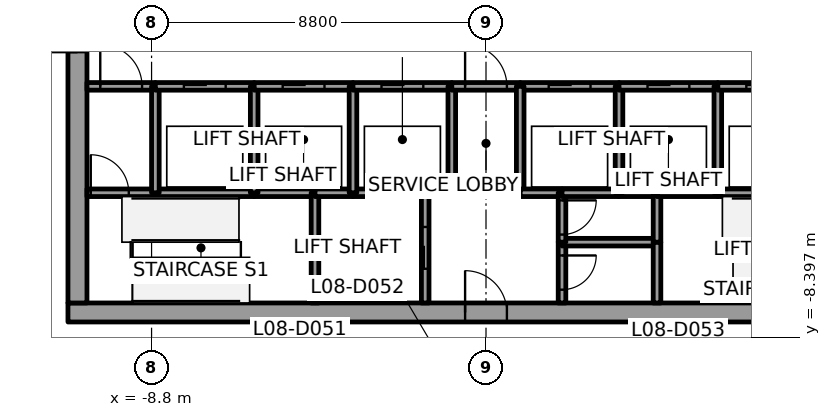
"""IFC4 building model, lengths in metres.
Left out: names, types, materials, properties, quantities, classifications, styles, units other than length and angle.
Written with IfcOpenShell. Run it as: python <this file> out.ifc"""

import sys

from ifc_helpers import new_model, si_unit, direction, frame, frame_2d, origin, place, context, subcontext, project, spatial, rectangle, extrude, element, fill, save


model = new_model("IFC4")
c1 = context("Model", 3, precision=1e-05, world=origin(), true_north=direction((0.0, 1.0)))
c2 = subcontext(c1, "Body", "Model", "MODEL_VIEW")
j1 = project(units=[si_unit("LENGTHUNIT", "METRE"), si_unit("PLANEANGLEUNIT", "RADIAN")], contexts=[c1])
p1 = place(None, origin())
s1 = spatial("IfcSite", under=j1, at=p1, CompositionType="ELEMENT")
p2 = place(p1, origin())
s2 = spatial("IfcBuilding", under=s1, at=p2, CompositionType="ELEMENT")
p3 = place(p2, frame((0.0, 0.0, 51.7)))
s3 = spatial("IfcBuildingStorey", under=s2, at=p3, CompositionType="ELEMENT", Elevation=51.7)
p4 = place(p3, frame((-11.0, -7.75, 0.0), z_axis=(0.0, 0.0, 1.0), x_axis=(1.0, 0.0, 0.0)))
e1 = element("IfcWall", 1, at=p4, inside=s3, PredefinedType="SHEAR", context=c2, shape_type="SweptSolid", body=[
    extrude(rectangle(XDim=22.0, YDim=0.5, at=frame_2d((11.0, 0.0))), origin(), (0.0, 0.0, 1.0), 3.7),
])
p5 = place(p4, frame((10.45, 0.0, 0.0)))
e2 = element("IfcOpeningElement", 2, at=p5, cuts=e1, PredefinedType="OPENING", context=c2, shape_type="SweptSolid", body=[
    extrude(rectangle(XDim=1.1, YDim=2.1, at=frame_2d((0.55, 1.05))), frame((0.0, 0.25, 0.0), z_axis=(0.0, -1.0, 0.0), x_axis=(1.0, 0.0, 0.0)), (0.0, 0.0, 1.0), 0.5),
])
p6 = place(p3, frame((-10.75, -7.5, 0.0), z_axis=(0.0, 0.0, 1.0), x_axis=(0.0, 1.0, 0.0)))
e3 = element("IfcWall", 3, at=p6, inside=s3, PredefinedType="SHEAR", context=c2, shape_type="SweptSolid", body=[
    extrude(rectangle(XDim=15.0, YDim=0.5, at=frame_2d((7.5, 0.0))), origin(), (0.0, 0.0, 1.0), 3.7),
])
p7 = place(p6, frame((6.6, 0.0, 0.0)))
e4 = element("IfcOpeningElement", 4, at=p7, cuts=e3, PredefinedType="OPENING", context=c2, shape_type="SweptSolid", body=[
    extrude(rectangle(XDim=1.8, YDim=2.1, at=frame_2d((0.9, 1.05))), frame((0.0, 0.25, 0.0), z_axis=(0.0, -1.0, 0.0), x_axis=(1.0, 0.0, 0.0)), (0.0, 0.0, 1.0), 0.5),
])
p8 = place(p3, frame((-10.5, -4.6, 0.0), z_axis=(0.0, 0.0, 1.0), x_axis=(1.0, 0.0, 0.0)))
e5 = element("IfcWall", 5, at=p8, inside=s3, PredefinedType="SOLIDWALL", context=c2, shape_type="SweptSolid", body=[
    extrude(rectangle(XDim=1.8, YDim=0.2, at=frame_2d((0.9, 0.0))), origin(), (0.0, 0.0, 1.0), 3.55),
])
p9 = place(p8, frame((0.1, 0.0, 0.0)))
e6 = element("IfcOpeningElement", 6, at=p9, cuts=e5, PredefinedType="OPENING", context=c2, shape_type="SweptSolid", body=[
    extrude(rectangle(XDim=1.0, YDim=2.1, at=frame_2d((0.5, 1.05))), frame((0.0, 0.1, 0.0), z_axis=(0.0, -1.0, 0.0), x_axis=(1.0, 0.0, 0.0)), (0.0, 0.0, 1.0), 0.2),
])
p10 = place(p3, frame((-10.5, -1.8, 0.0), z_axis=(0.0, 0.0, 1.0), x_axis=(1.0, 0.0, 0.0)))
e7 = element("IfcWall", 7, at=p10, inside=s3, PredefinedType="SOLIDWALL", context=c2, shape_type="SweptSolid", body=[
    extrude(rectangle(XDim=1.8, YDim=0.2, at=frame_2d((0.9, 0.0))), origin(), (0.0, 0.0, 1.0), 3.55),
])
p11 = place(p10, frame((0.35, 0.0, 0.0)))
e8 = element("IfcOpeningElement", 8, at=p11, cuts=e7, PredefinedType="OPENING", context=c2, shape_type="SweptSolid", body=[
    extrude(rectangle(XDim=1.1, YDim=2.1, at=frame_2d((0.55, 1.05))), frame((0.0, 0.1, 0.0), z_axis=(0.0, -1.0, 0.0), x_axis=(1.0, 0.0, 0.0)), (0.0, 0.0, 1.0), 0.2),
])
p12 = place(p3, frame((-8.7, -4.6, 0.0), z_axis=(0.0, 0.0, 1.0), x_axis=(1.0, 0.0, 0.0)))
e9 = element("IfcWall", 9, at=p12, inside=s3, PredefinedType="SOLIDWALL", context=c2, shape_type="SweptSolid", body=[
    extrude(rectangle(XDim=2.6, YDim=0.2, at=frame_2d((1.3, 0.0))), origin(), (0.0, 0.0, 1.0), 3.55),
])
p13 = place(p3, frame((-8.7, -4.6, 0.0), z_axis=(0.0, 0.0, 1.0), x_axis=(0.0, 1.0, 0.0)))
e10 = element("IfcWall", 10, at=p13, inside=s3, PredefinedType="SOLIDWALL", context=c2, shape_type="SweptSolid", body=[
    extrude(rectangle(XDim=2.8, YDim=0.2, at=frame_2d((1.4, 0.0))), origin(), (0.0, 0.0, 1.0), 3.55),
])
p14 = place(p3, frame((-8.7, -1.8, 0.0), z_axis=(0.0, 0.0, 1.0), x_axis=(1.0, 0.0, 0.0)))
e11 = element("IfcWall", 11, at=p14, inside=s3, PredefinedType="SOLIDWALL", context=c2, shape_type="SweptSolid", body=[
    extrude(rectangle(XDim=2.6, YDim=0.2, at=frame_2d((1.3, 0.0))), origin(), (0.0, 0.0, 1.0), 3.55),
])
p15 = place(p14, frame((0.75, 0.0, 0.0)))
e12 = element("IfcOpeningElement", 12, at=p15, cuts=e11, PredefinedType="OPENING", context=c2, shape_type="SweptSolid", body=[
    extrude(rectangle(XDim=1.1, YDim=2.1, at=frame_2d((0.55, 1.05))), frame((0.0, 0.1, 0.0), z_axis=(0.0, -1.0, 0.0), x_axis=(1.0, 0.0, 0.0)), (0.0, 0.0, 1.0), 0.2),
])
p16 = place(p3, frame((-6.1, -4.6, 0.0), z_axis=(0.0, 0.0, 1.0), x_axis=(1.0, 0.0, 0.0)))
e13 = element("IfcWall", 13, at=p16, inside=s3, PredefinedType="SOLIDWALL", context=c2, shape_type="SweptSolid", body=[
    extrude(rectangle(XDim=1.6, YDim=0.2, at=frame_2d((0.8, 0.0))), origin(), (0.0, 0.0, 1.0), 3.55),
])
p17 = place(p3, frame((-6.1, -4.6, 0.0), z_axis=(0.0, 0.0, 1.0), x_axis=(0.0, 1.0, 0.0)))
e14 = element("IfcWall", 14, at=p17, inside=s3, PredefinedType="SOLIDWALL", context=c2, shape_type="SweptSolid", body=[
    extrude(rectangle(XDim=2.8, YDim=0.2, at=frame_2d((1.4, 0.0))), origin(), (0.0, 0.0, 1.0), 3.55),
])
p18 = place(p3, frame((-6.1, -1.8, 0.0), z_axis=(0.0, 0.0, 1.0), x_axis=(1.0, 0.0, 0.0)))
e15 = element("IfcWall", 15, at=p18, inside=s3, PredefinedType="SOLIDWALL", context=c2, shape_type="SweptSolid", body=[
    extrude(rectangle(XDim=2.6, YDim=0.2, at=frame_2d((1.3, 0.0))), origin(), (0.0, 0.0, 1.0), 3.55),
])
p19 = place(p18, frame((0.75, 0.0, 0.0)))
e16 = element("IfcOpeningElement", 16, at=p19, cuts=e15, PredefinedType="OPENING", context=c2, shape_type="SweptSolid", body=[
    extrude(rectangle(XDim=1.1, YDim=2.1, at=frame_2d((0.55, 1.05))), frame((0.0, 0.1, 0.0), z_axis=(0.0, -1.0, 0.0), x_axis=(1.0, 0.0, 0.0)), (0.0, 0.0, 1.0), 0.2),
])
p20 = place(p3, frame((-4.5, -4.6, 0.0), z_axis=(0.0, 0.0, 1.0), x_axis=(0.0, -1.0, 0.0)))
e17 = element("IfcWall", 17, at=p20, inside=s3, PredefinedType="SOLIDWALL", context=c2, shape_type="SweptSolid", body=[
    extrude(rectangle(XDim=2.9, YDim=0.2, at=frame_2d((1.45, 0.0))), origin(), (0.0, 0.0, 1.0), 3.55),
])
p21 = place(p3, frame((-4.5, -4.6, 0.0), z_axis=(0.0, 0.0, 1.0), x_axis=(1.0, 0.0, 0.0)))
e18 = element("IfcWall", 18, at=p21, inside=s3, PredefinedType="SOLIDWALL", context=c2, shape_type="SweptSolid", body=[
    extrude(rectangle(XDim=1.0, YDim=0.2, at=frame_2d((0.5, 0.0))), origin(), (0.0, 0.0, 1.0), 3.55),
])
p22 = place(p3, frame((-3.5, -4.6, 0.0), z_axis=(0.0, 0.0, 1.0), x_axis=(1.0, 0.0, 0.0)))
e19 = element("IfcWall", 19, at=p22, inside=s3, PredefinedType="SOLIDWALL", context=c2, shape_type="SweptSolid", body=[
    extrude(rectangle(XDim=1.9, YDim=0.2, at=frame_2d((0.95, 0.0))), origin(), (0.0, 0.0, 1.0), 3.55),
])
p23 = place(p3, frame((-3.5, -4.6, 0.0), z_axis=(0.0, 0.0, 1.0), x_axis=(0.0, 1.0, 0.0)))
e20 = element("IfcWall", 20, at=p23, inside=s3, PredefinedType="SOLIDWALL", context=c2, shape_type="SweptSolid", body=[
    extrude(rectangle(XDim=2.8, YDim=0.2, at=frame_2d((1.4, 0.0))), origin(), (0.0, 0.0, 1.0), 3.55),
])
p24 = place(p3, frame((-3.5, -1.8, 0.0), z_axis=(0.0, 0.0, 1.0), x_axis=(1.0, 0.0, 0.0)))
e21 = element("IfcWall", 21, at=p24, inside=s3, PredefinedType="SOLIDWALL", context=c2, shape_type="SweptSolid", body=[
    extrude(rectangle(XDim=2.6, YDim=0.2, at=frame_2d((1.3, 0.0))), origin(), (0.0, 0.0, 1.0), 3.55),
])
p25 = place(p24, frame((0.75, 0.0, 0.0)))
e22 = element("IfcOpeningElement", 22, at=p25, cuts=e21, PredefinedType="OPENING", context=c2, shape_type="SweptSolid", body=[
    extrude(rectangle(XDim=1.1, YDim=2.1, at=frame_2d((0.55, 1.05))), frame((0.0, 0.1, 0.0), z_axis=(0.0, -1.0, 0.0), x_axis=(1.0, 0.0, 0.0)), (0.0, 0.0, 1.0), 0.2),
])
p26 = place(p3, frame((-1.6, -7.5, 0.0), z_axis=(0.0, 0.0, 1.0), x_axis=(0.0, 1.0, 0.0)))
e23 = element("IfcWall", 23, at=p26, inside=s3, PredefinedType="SOLIDWALL", context=c2, shape_type="SweptSolid", body=[
    extrude(rectangle(XDim=2.9, YDim=0.2, at=frame_2d((1.45, 0.0))), origin(), (0.0, 0.0, 1.0), 3.55),
])
p27 = place(p26, frame((0.9, 0.0, 0.0)))
e24 = element("IfcOpeningElement", 24, at=p27, cuts=e23, PredefinedType="OPENING", context=c2, shape_type="SweptSolid", body=[
    extrude(rectangle(XDim=1.1, YDim=2.1, at=frame_2d((0.55, 1.05))), frame((0.0, 0.1, 0.0), z_axis=(0.0, -1.0, 0.0), x_axis=(1.0, 0.0, 0.0)), (0.0, 0.0, 1.0), 0.2),
])
p28 = place(p3, frame((-1.6, -4.6, 0.0), z_axis=(0.0, 0.0, 1.0), x_axis=(1.0, 0.0, 0.0)))
e25 = element("IfcWall", 25, at=p28, inside=s3, PredefinedType="SOLIDWALL", context=c2, shape_type="SweptSolid", body=[
    extrude(rectangle(XDim=0.7, YDim=0.2, at=frame_2d((0.35, 0.0))), origin(), (0.0, 0.0, 1.0), 3.55),
])
p29 = place(p3, frame((-0.9, -4.6, 0.0), z_axis=(0.0, 0.0, 1.0), x_axis=(0.0, 1.0, 0.0)))
e26 = element("IfcWall", 26, at=p29, inside=s3, PredefinedType="SOLIDWALL", context=c2, shape_type="SweptSolid", body=[
    extrude(rectangle(XDim=2.8, YDim=0.2, at=frame_2d((1.4, 0.0))), origin(), (0.0, 0.0, 1.0), 3.55),
])
p30 = place(p3, frame((-0.9, -1.8, 0.0), z_axis=(0.0, 0.0, 1.0), x_axis=(1.0, 0.0, 0.0)))
e27 = element("IfcWall", 27, at=p30, inside=s3, PredefinedType="SOLIDWALL", context=c2, shape_type="SweptSolid", body=[
    extrude(rectangle(XDim=1.8, YDim=0.2, at=frame_2d((0.9, 0.0))), origin(), (0.0, 0.0, 1.0), 3.55),
])
p31 = place(p30, frame((0.35, 0.0, 0.0)))
e28 = element("IfcOpeningElement", 28, at=p31, cuts=e27, PredefinedType="OPENING", context=c2, shape_type="SweptSolid", body=[
    extrude(rectangle(XDim=1.1, YDim=2.1, at=frame_2d((0.55, 1.05))), frame((0.0, 0.1, 0.0), z_axis=(0.0, -1.0, 0.0), x_axis=(1.0, 0.0, 0.0)), (0.0, 0.0, 1.0), 0.2),
])
p32 = place(p3, frame((0.9, -1.8, 0.0), z_axis=(0.0, 0.0, 1.0), x_axis=(1.0, 0.0, 0.0)))
e29 = element("IfcWall", 29, at=p32, inside=s3, PredefinedType="SOLIDWALL", context=c2, shape_type="SweptSolid", body=[
    extrude(rectangle(XDim=2.6, YDim=0.2, at=frame_2d((1.3, 0.0))), origin(), (0.0, 0.0, 1.0), 3.55),
])
p33 = place(p32, frame((0.75, 0.0, 0.0)))
e30 = element("IfcOpeningElement", 30, at=p33, cuts=e29, PredefinedType="OPENING", context=c2, shape_type="SweptSolid", body=[
    extrude(rectangle(XDim=1.1, YDim=2.1, at=frame_2d((0.55, 1.05))), frame((0.0, 0.1, 0.0), z_axis=(0.0, -1.0, 0.0), x_axis=(1.0, 0.0, 0.0)), (0.0, 0.0, 1.0), 0.2),
])
p34 = place(p3, frame((0.9, -1.8, 0.0), z_axis=(0.0, 0.0, 1.0), x_axis=(0.0, -1.0, 0.0)))
e31 = element("IfcWall", 31, at=p34, inside=s3, PredefinedType="SOLIDWALL", context=c2, shape_type="SweptSolid", body=[
    extrude(rectangle(XDim=2.8, YDim=0.2, at=frame_2d((1.4, 0.0))), origin(), (0.0, 0.0, 1.0), 3.55),
])
p35 = place(p3, frame((0.9, -4.6, 0.0), z_axis=(0.0, 0.0, 1.0), x_axis=(1.0, 0.0, 0.0)))
e32 = element("IfcWall", 32, at=p35, inside=s3, PredefinedType="SOLIDWALL", context=c2, shape_type="SweptSolid", body=[
    extrude(rectangle(XDim=1.1, YDim=0.2, at=frame_2d((0.55, 0.0))), origin(), (0.0, 0.0, 1.0), 3.55),
])
p36 = place(p3, frame((2.0, -5.9, 0.0), z_axis=(0.0, 0.0, 1.0), x_axis=(0.0, -1.0, 0.0)))
e33 = element("IfcWall", 33, at=p36, inside=s3, PredefinedType="SOLIDWALL", context=c2, shape_type="SweptSolid", body=[
    extrude(rectangle(XDim=1.6, YDim=0.2, at=frame_2d((0.8, 0.0))), origin(), (0.0, 0.0, 1.0), 3.55),
])
p37 = place(p36, frame((0.35, 0.0, 0.0)))
e34 = element("IfcOpeningElement", 34, at=p37, cuts=e33, PredefinedType="OPENING", context=c2, shape_type="SweptSolid", body=[
    extrude(rectangle(XDim=0.9, YDim=2.1, at=frame_2d((0.45, 1.05))), frame((0.0, 0.1, 0.0), z_axis=(0.0, -1.0, 0.0), x_axis=(1.0, 0.0, 0.0)), (0.0, 0.0, 1.0), 0.2),
])
p38 = place(p3, frame((4.5, -5.9, 0.0), z_axis=(0.0, 0.0, 1.0), x_axis=(-1.0, 0.0, 0.0)))
e35 = element("IfcWall", 35, at=p38, inside=s3, PredefinedType="SOLIDWALL", context=c2, shape_type="SweptSolid", body=[
    extrude(rectangle(XDim=2.5, YDim=0.2, at=frame_2d((1.25, 0.0))), origin(), (0.0, 0.0, 1.0), 3.55),
])
p39 = place(p3, frame((2.0, -4.6, 0.0), z_axis=(0.0, 0.0, 1.0), x_axis=(0.0, -1.0, 0.0)))
e36 = element("IfcWall", 36, at=p39, inside=s3, PredefinedType="SOLIDWALL", context=c2, shape_type="SweptSolid", body=[
    extrude(rectangle(XDim=1.3, YDim=0.2, at=frame_2d((0.65, 0.0))), origin(), (0.0, 0.0, 1.0), 3.55),
])
p40 = place(p39, frame((0.2, 0.0, 0.0)))
e37 = element("IfcOpeningElement", 37, at=p40, cuts=e36, PredefinedType="OPENING", context=c2, shape_type="SweptSolid", body=[
    extrude(rectangle(XDim=0.9, YDim=2.1, at=frame_2d((0.45, 1.05))), frame((0.0, 0.1, 0.0), z_axis=(0.0, -1.0, 0.0), x_axis=(1.0, 0.0, 0.0)), (0.0, 0.0, 1.0), 0.2),
])
p41 = place(p3, frame((3.5, -4.6, 0.0), z_axis=(0.0, 0.0, 1.0), x_axis=(-1.0, 0.0, 0.0)))
e38 = element("IfcWall", 38, at=p41, inside=s3, PredefinedType="SOLIDWALL", context=c2, shape_type="SweptSolid", body=[
    extrude(rectangle(XDim=1.5, YDim=0.2, at=frame_2d((0.75, 0.0))), origin(), (0.0, 0.0, 1.0), 3.55),
])
p42 = place(p3, frame((4.5, -4.6, 0.0), z_axis=(0.0, 0.0, 1.0), x_axis=(-1.0, 0.0, 0.0)))
e39 = element("IfcWall", 39, at=p42, inside=s3, PredefinedType="SOLIDWALL", context=c2, shape_type="SweptSolid", body=[
    extrude(rectangle(XDim=1.0, YDim=0.2, at=frame_2d((0.5, 0.0))), origin(), (0.0, 0.0, 1.0), 3.55),
])
p43 = place(p3, frame((3.5, -4.6, 0.0), z_axis=(0.0, 0.0, 1.0), x_axis=(0.0, 1.0, 0.0)))
e40 = element("IfcWall", 40, at=p43, inside=s3, PredefinedType="SOLIDWALL", context=c2, shape_type="SweptSolid", body=[
    extrude(rectangle(XDim=2.8, YDim=0.2, at=frame_2d((1.4, 0.0))), origin(), (0.0, 0.0, 1.0), 3.55),
])
p44 = place(p3, frame((3.5, -1.8, 0.0), z_axis=(0.0, 0.0, 1.0), x_axis=(1.0, 0.0, 0.0)))
e41 = element("IfcWall", 41, at=p44, inside=s3, PredefinedType="SOLIDWALL", context=c2, shape_type="SweptSolid", body=[
    extrude(rectangle(XDim=2.6, YDim=0.2, at=frame_2d((1.3, 0.0))), origin(), (0.0, 0.0, 1.0), 3.55),
])
p45 = place(p44, frame((0.75, 0.0, 0.0)))
e42 = element("IfcOpeningElement", 42, at=p45, cuts=e41, PredefinedType="OPENING", context=c2, shape_type="SweptSolid", body=[
    extrude(rectangle(XDim=1.1, YDim=2.1, at=frame_2d((0.55, 1.05))), frame((0.0, 0.1, 0.0), z_axis=(0.0, -1.0, 0.0), x_axis=(1.0, 0.0, 0.0)), (0.0, 0.0, 1.0), 0.2),
])
p46 = place(p3, frame((4.5, -7.5, 0.0), z_axis=(0.0, 0.0, 1.0), x_axis=(0.0, 1.0, 0.0)))
e43 = element("IfcWall", 43, at=p46, inside=s3, PredefinedType="SOLIDWALL", context=c2, shape_type="SweptSolid", body=[
    extrude(rectangle(XDim=1.6, YDim=0.2, at=frame_2d((0.8, 0.0))), origin(), (0.0, 0.0, 1.0), 3.55),
])
p47 = place(p3, frame((4.5, -5.9, 0.0), z_axis=(0.0, 0.0, 1.0), x_axis=(0.0, 1.0, 0.0)))
e44 = element("IfcWall", 44, at=p47, inside=s3, PredefinedType="SOLIDWALL", context=c2, shape_type="SweptSolid", body=[
    extrude(rectangle(XDim=1.3, YDim=0.2, at=frame_2d((0.65, 0.0))), origin(), (0.0, 0.0, 1.0), 3.55),
])
p48 = place(p3, frame((4.5, -4.6, 0.0), z_axis=(0.0, 0.0, 1.0), x_axis=(1.0, 0.0, 0.0)))
e45 = element("IfcWall", 45, at=p48, inside=s3, PredefinedType="SOLIDWALL", context=c2, shape_type="SweptSolid", body=[
    extrude(rectangle(XDim=1.6, YDim=0.2, at=frame_2d((0.8, 0.0))), origin(), (0.0, 0.0, 1.0), 3.55),
])
p49 = place(p3, frame((6.1, -4.6, 0.0), z_axis=(0.0, 0.0, 1.0), x_axis=(1.0, 0.0, 0.0)))
e46 = element("IfcWall", 46, at=p49, inside=s3, PredefinedType="SOLIDWALL", context=c2, shape_type="SweptSolid", body=[
    extrude(rectangle(XDim=2.6, YDim=0.2, at=frame_2d((1.3, 0.0))), origin(), (0.0, 0.0, 1.0), 3.55),
])
p50 = place(p3, frame((6.1, -4.6, 0.0), z_axis=(0.0, 0.0, 1.0), x_axis=(0.0, 1.0, 0.0)))
e47 = element("IfcWall", 47, at=p50, inside=s3, PredefinedType="SOLIDWALL", context=c2, shape_type="SweptSolid", body=[
    extrude(rectangle(XDim=2.8, YDim=0.2, at=frame_2d((1.4, 0.0))), origin(), (0.0, 0.0, 1.0), 3.55),
])
p51 = place(p3, frame((6.1, -1.8, 0.0), z_axis=(0.0, 0.0, 1.0), x_axis=(1.0, 0.0, 0.0)))
e48 = element("IfcWall", 48, at=p51, inside=s3, PredefinedType="SOLIDWALL", context=c2, shape_type="SweptSolid", body=[
    extrude(rectangle(XDim=2.6, YDim=0.2, at=frame_2d((1.3, 0.0))), origin(), (0.0, 0.0, 1.0), 3.55),
])
p52 = place(p51, frame((0.75, 0.0, 0.0)))
e49 = element("IfcOpeningElement", 49, at=p52, cuts=e48, PredefinedType="OPENING", context=c2, shape_type="SweptSolid", body=[
    extrude(rectangle(XDim=1.1, YDim=2.1, at=frame_2d((0.55, 1.05))), frame((0.0, 0.1, 0.0), z_axis=(0.0, -1.0, 0.0), x_axis=(1.0, 0.0, 0.0)), (0.0, 0.0, 1.0), 0.2),
])
p53 = place(p15, origin())
e50 = element("IfcDoor", 50, at=p53, inside=s3, OperationType="SLIDING_TO_RIGHT", PredefinedType="DOOR", context=c2, shape_type="SweptSolid", body=[
    extrude(rectangle(XDim=1.1, YDim=2.1, at=frame_2d((0.55, 1.05))), frame((0.0, 0.025, 0.0), z_axis=(0.0, -1.0, 0.0), x_axis=(1.0, 0.0, 0.0)), (0.0, 0.0, 1.0), 0.05),
])
fill(e12, e50)
p54 = place(p19, origin())
e51 = element("IfcDoor", 51, at=p54, inside=s3, OperationType="SLIDING_TO_LEFT", PredefinedType="DOOR", context=c2, shape_type="SweptSolid", body=[
    extrude(rectangle(XDim=1.1, YDim=2.1, at=frame_2d((0.55, 1.05))), frame((0.0, 0.025, 0.0), z_axis=(0.0, -1.0, 0.0), x_axis=(1.0, 0.0, 0.0)), (0.0, 0.0, 1.0), 0.05),
])
fill(e16, e51)
p55 = place(p25, origin())
e52 = element("IfcDoor", 52, at=p55, inside=s3, OperationType="SLIDING_TO_RIGHT", PredefinedType="DOOR", context=c2, shape_type="SweptSolid", body=[
    extrude(rectangle(XDim=1.1, YDim=2.1, at=frame_2d((0.55, 1.05))), frame((0.0, 0.025, 0.0), z_axis=(0.0, -1.0, 0.0), x_axis=(1.0, 0.0, 0.0)), (0.0, 0.0, 1.0), 0.05),
])
fill(e22, e52)
p56 = place(p33, origin())
e53 = element("IfcDoor", 53, at=p56, inside=s3, OperationType="SLIDING_TO_LEFT", PredefinedType="DOOR", context=c2, shape_type="SweptSolid", body=[
    extrude(rectangle(XDim=1.1, YDim=2.1, at=frame_2d((0.55, 1.05))), frame((0.0, 0.025, 0.0), z_axis=(0.0, -1.0, 0.0), x_axis=(1.0, 0.0, 0.0)), (0.0, 0.0, 1.0), 0.05),
])
fill(e30, e53)
p57 = place(p45, origin())
e54 = element("IfcDoor", 54, at=p57, inside=s3, OperationType="SLIDING_TO_LEFT", PredefinedType="DOOR", context=c2, shape_type="SweptSolid", body=[
    extrude(rectangle(XDim=1.1, YDim=2.1, at=frame_2d((0.55, 1.05))), frame((0.0, 0.025, 0.0), z_axis=(0.0, -1.0, 0.0), x_axis=(1.0, 0.0, 0.0)), (0.0, 0.0, 1.0), 0.05),
])
fill(e42, e54)
p58 = place(p52, origin())
e55 = element("IfcDoor", 55, at=p58, inside=s3, OperationType="SLIDING_TO_LEFT", PredefinedType="DOOR", context=c2, shape_type="SweptSolid", body=[
    extrude(rectangle(XDim=1.1, YDim=2.1, at=frame_2d((0.55, 1.05))), frame((0.0, 0.025, 0.0), z_axis=(0.0, -1.0, 0.0), x_axis=(1.0, 0.0, 0.0)), (0.0, 0.0, 1.0), 0.05),
])
fill(e49, e55)
p59 = place(p27, origin())
e56 = element("IfcDoor", 56, at=p59, inside=s3, OperationType="SLIDING_TO_RIGHT", PredefinedType="DOOR", context=c2, shape_type="SweptSolid", body=[
    extrude(rectangle(XDim=1.1, YDim=2.1, at=frame_2d((0.55, 1.05))), frame((0.0, 0.025, 0.0), z_axis=(0.0, -1.0, 0.0), x_axis=(1.0, 0.0, 0.0)), (0.0, 0.0, 1.0), 0.05),
])
fill(e24, e56)
p60 = place(p11, origin())
e57 = element("IfcDoor", 57, at=p60, inside=s3, OperationType="SINGLE_SWING_RIGHT", PredefinedType="DOOR", context=c2, shape_type="SweptSolid", body=[
    extrude(rectangle(XDim=1.1, YDim=2.1, at=frame_2d((0.55, 1.05))), frame((0.0, 0.025, 0.0), z_axis=(0.0, -1.0, 0.0), x_axis=(1.0, 0.0, 0.0)), (0.0, 0.0, 1.0), 0.05),
])
fill(e8, e57)
p61 = place(p31, origin())
e58 = element("IfcDoor", 58, at=p61, inside=s3, OperationType="SINGLE_SWING_LEFT", PredefinedType="DOOR", context=c2, shape_type="SweptSolid", body=[
    extrude(rectangle(XDim=1.1, YDim=2.1, at=frame_2d((0.55, 1.05))), frame((0.0, 0.025, 0.0), z_axis=(0.0, -1.0, 0.0), x_axis=(1.0, 0.0, 0.0)), (0.0, 0.0, 1.0), 0.05),
])
fill(e28, e58)
p62 = place(p9, origin())
e59 = element("IfcDoor", 59, at=p62, inside=s3, OperationType="SINGLE_SWING_LEFT", PredefinedType="DOOR", context=c2, shape_type="SweptSolid", body=[
    extrude(rectangle(XDim=1.0, YDim=2.1, at=frame_2d((0.5, 1.05))), frame((0.0, 0.025, 0.0), z_axis=(0.0, -1.0, 0.0), x_axis=(1.0, 0.0, 0.0)), (0.0, 0.0, 1.0), 0.05),
])
fill(e6, e59)
p63 = place(p37, origin())
e60 = element("IfcDoor", 60, at=p63, inside=s3, OperationType="SINGLE_SWING_LEFT", PredefinedType="DOOR", context=c2, shape_type="SweptSolid", body=[
    extrude(rectangle(XDim=0.9, YDim=2.1, at=frame_2d((0.45, 1.05))), frame((0.0, 0.025, 0.0), z_axis=(0.0, -1.0, 0.0), x_axis=(1.0, 0.0, 0.0)), (0.0, 0.0, 1.0), 0.05),
])
fill(e34, e60)
p64 = place(p40, origin())
e61 = element("IfcDoor", 61, at=p64, inside=s3, OperationType="SINGLE_SWING_LEFT", PredefinedType="DOOR", context=c2, shape_type="SweptSolid", body=[
    extrude(rectangle(XDim=0.9, YDim=2.1, at=frame_2d((0.45, 1.05))), frame((0.0, 0.025, 0.0), z_axis=(0.0, -1.0, 0.0), x_axis=(1.0, 0.0, 0.0)), (0.0, 0.0, 1.0), 0.05),
])
fill(e37, e61)
p65 = place(p7, origin())
e62 = element("IfcDoor", 62, at=p65, inside=s3, OperationType="DOUBLE_DOOR_SINGLE_SWING", PredefinedType="DOOR", context=c2, shape_type="SweptSolid", body=[
    extrude(rectangle(XDim=1.8, YDim=2.1, at=frame_2d((0.9, 1.05))), frame((0.0, 0.025, 0.0), z_axis=(0.0, -1.0, 0.0), x_axis=(1.0, 0.0, 0.0)), (0.0, 0.0, 1.0), 0.05),
])
fill(e4, e62)
p66 = place(p5, origin())
e63 = element("IfcDoor", 63, at=p66, inside=s3, OperationType="SINGLE_SWING_LEFT", PredefinedType="DOOR", context=c2, shape_type="SweptSolid", body=[
    extrude(rectangle(XDim=1.1, YDim=2.1, at=frame_2d((0.55, 1.05))), frame((0.0, 0.025, 0.0), z_axis=(0.0, -1.0, 0.0), x_axis=(1.0, 0.0, 0.0)), (0.0, 0.0, 1.0), 0.05),
])
fill(e2, e63)
save(model, sys.argv[1])
